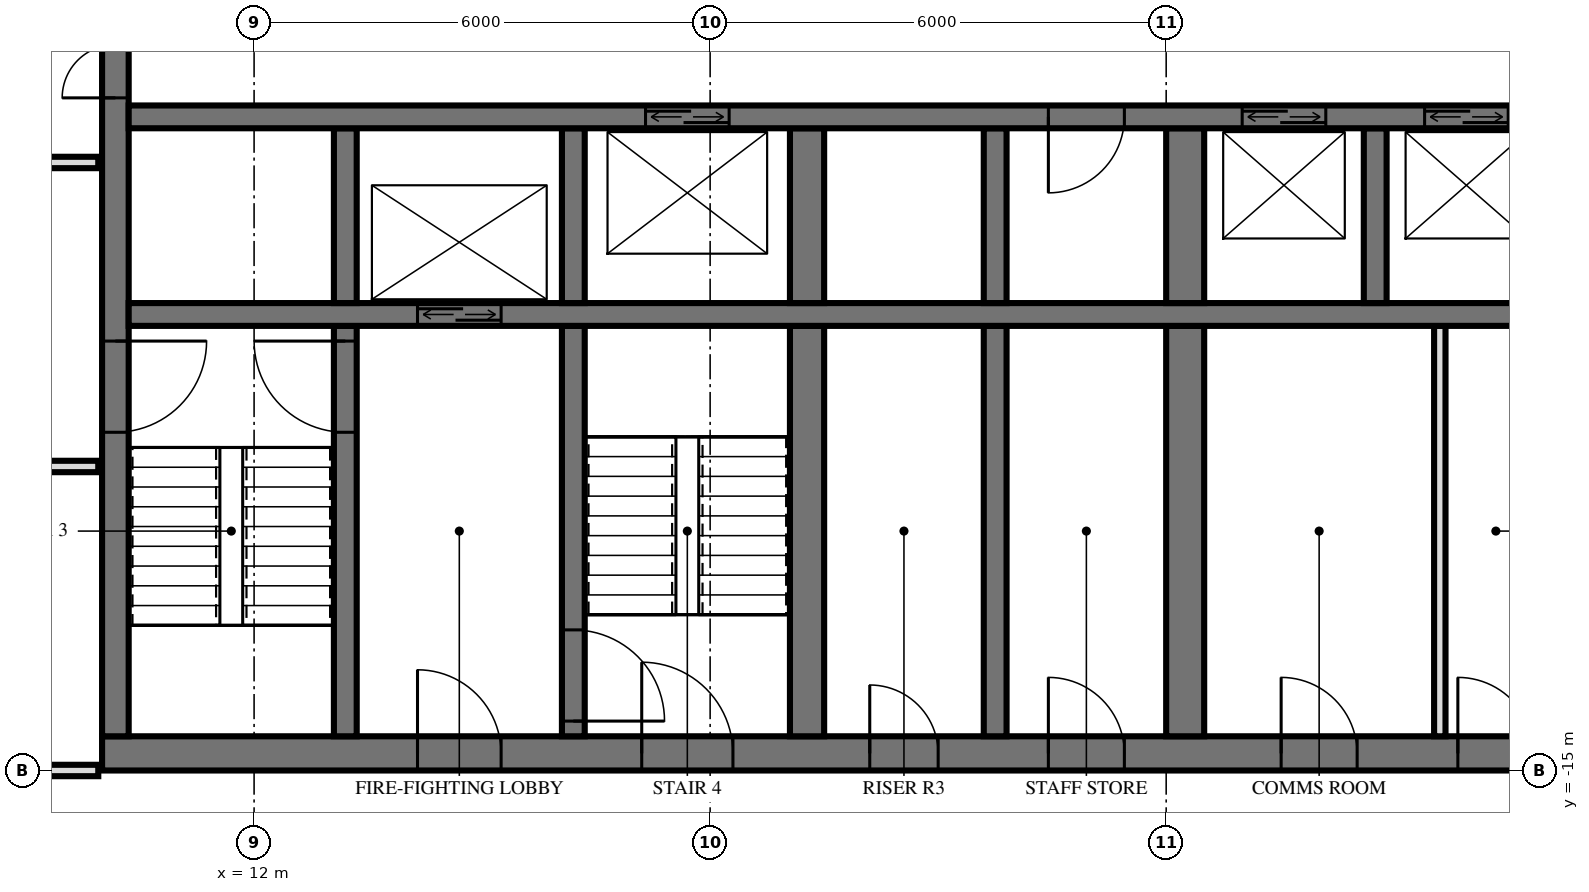
"""IFC4 building model, lengths in metres.
Left out: names, types, materials, properties, quantities, classifications, styles, units other than length and angle.
Written with IfcOpenShell. Run it as: python <this file> out.ifc"""

import sys

from ifc_helpers import new_model, si_unit, direction, frame, frame_2d, origin, place, context, subcontext, project, spatial, rectangle, extrude, element, fill, save


model = new_model("IFC4")
c1 = context("Model", 3, precision=1e-05, world=origin(), true_north=direction((0.0, 1.0)))
c2 = subcontext(c1, "Body", "Model", "MODEL_VIEW")
j1 = project(units=[si_unit("LENGTHUNIT", "METRE"), si_unit("PLANEANGLEUNIT", "RADIAN")], contexts=[c1])
p1 = place(None, origin())
s1 = spatial("IfcSite", under=j1, at=p1, CompositionType="ELEMENT")
p2 = place(p1, origin())
s2 = spatial("IfcBuilding", under=s1, at=p2, CompositionType="ELEMENT")
p3 = place(p2, frame((0.0, 0.0, 34.8)))
s3 = spatial("IfcBuildingStorey", under=s2, at=p3, CompositionType="ELEMENT", Elevation=34.8)
p4 = place(p3, frame((10.0, -14.775, 0.0), z_axis=(0.0, 0.0, 1.0), x_axis=(1.0, 0.0, 0.0)))
e1 = element("IfcWall", 1, at=p4, inside=s3, PredefinedType="SHEAR", context=c2, shape_type="SweptSolid", body=[
    extrude(rectangle(XDim=19.5, YDim=0.45, at=frame_2d((9.75, 0.0))), origin(), (0.0, 0.0, 1.0), 3.6),
])
p5 = place(p4, frame((7.1, 0.0, 0.0)))
e2 = element("IfcOpeningElement", 2, at=p5, cuts=e1, PredefinedType="OPENING", context=c2, shape_type="SweptSolid", body=[
    extrude(rectangle(XDim=1.2, YDim=2.1, at=frame_2d((0.6, 1.05))), frame((0.0, 0.235, 0.0), z_axis=(0.0, -1.0, 0.0), x_axis=(1.0, 0.0, 0.0)), (0.0, 0.0, 1.0), 0.47),
])
p6 = place(p4, frame((4.15, 0.0, 0.0)))
e3 = element("IfcOpeningElement", 3, at=p6, cuts=e1, PredefinedType="OPENING", context=c2, shape_type="SweptSolid", body=[
    extrude(rectangle(XDim=1.1, YDim=2.1, at=frame_2d((0.55, 1.05))), frame((0.0, 0.235, 0.0), z_axis=(0.0, -1.0, 0.0), x_axis=(1.0, 0.0, 0.0)), (0.0, 0.0, 1.0), 0.47),
])
p7 = place(p4, frame((10.1, 0.0, 0.0)))
e4 = element("IfcOpeningElement", 4, at=p7, cuts=e1, PredefinedType="OPENING", context=c2, shape_type="SweptSolid", body=[
    extrude(rectangle(XDim=0.9, YDim=2.1, at=frame_2d((0.45, 1.05))), frame((0.0, 0.235, 0.0), z_axis=(0.0, -1.0, 0.0), x_axis=(1.0, 0.0, 0.0)), (0.0, 0.0, 1.0), 0.47),
])
p8 = place(p4, frame((12.45, 0.0, 0.0)))
e5 = element("IfcOpeningElement", 5, at=p8, cuts=e1, PredefinedType="OPENING", context=c2, shape_type="SweptSolid", body=[
    extrude(rectangle(XDim=1.0, YDim=2.1, at=frame_2d((0.5, 1.05))), frame((0.0, 0.235, 0.0), z_axis=(0.0, -1.0, 0.0), x_axis=(1.0, 0.0, 0.0)), (0.0, 0.0, 1.0), 0.47),
])
p9 = place(p4, frame((15.512, 0.0, 0.0)))
e6 = element("IfcOpeningElement", 6, at=p9, cuts=e1, PredefinedType="OPENING", context=c2, shape_type="SweptSolid", body=[
    extrude(rectangle(XDim=1.0, YDim=2.1, at=frame_2d((0.5, 1.05))), frame((0.0, 0.235, 0.0), z_axis=(0.0, -1.0, 0.0), x_axis=(1.0, 0.0, 0.0)), (0.0, 0.0, 1.0), 0.47),
])
p10 = place(p4, frame((17.837, 0.0, 0.0)))
e7 = element("IfcOpeningElement", 7, at=p10, cuts=e1, PredefinedType="OPENING", context=c2, shape_type="SweptSolid", body=[
    extrude(rectangle(XDim=1.0, YDim=2.1, at=frame_2d((0.5, 1.05))), frame((0.0, 0.235, 0.0), z_axis=(0.0, -1.0, 0.0), x_axis=(1.0, 0.0, 0.0)), (0.0, 0.0, 1.0), 0.47),
])
p11 = place(p3, frame((10.175, -14.55, 0.0), z_axis=(0.0, 0.0, 1.0), x_axis=(0.0, 1.0, 0.0)))
e8 = element("IfcWall", 8, at=p11, inside=s3, PredefinedType="SHEAR", context=c2, shape_type="SweptSolid", body=[
    extrude(rectangle(XDim=14.1, YDim=0.35, at=frame_2d((7.05, 0.0))), origin(), (0.0, 0.0, 1.0), 3.6),
])
p12 = place(p11, frame((8.4, 0.0, 0.0)))
e9 = element("IfcOpeningElement", 9, at=p12, cuts=e8, PredefinedType="OPENING", context=c2, shape_type="SweptSolid", body=[
    extrude(rectangle(XDim=1.4, YDim=2.4, at=frame_2d((0.7, 1.2))), frame((0.0, 0.185, 0.0), z_axis=(0.0, -1.0, 0.0), x_axis=(1.0, 0.0, 0.0)), (0.0, 0.0, 1.0), 0.37),
])
p13 = place(p11, frame((10.0, 0.0, 0.0)))
e10 = element("IfcOpeningElement", 10, at=p13, cuts=e8, PredefinedType="OPENING", context=c2, shape_type="SweptSolid", body=[
    extrude(rectangle(XDim=1.4, YDim=2.4, at=frame_2d((0.7, 1.2))), frame((0.0, 0.185, 0.0), z_axis=(0.0, -1.0, 0.0), x_axis=(1.0, 0.0, 0.0)), (0.0, 0.0, 1.0), 0.37),
])
p14 = place(p11, frame((4.0, 0.0, 0.0)))
e11 = element("IfcOpeningElement", 11, at=p14, cuts=e8, PredefinedType="OPENING", context=c2, shape_type="SweptSolid", body=[
    extrude(rectangle(XDim=1.2, YDim=2.1, at=frame_2d((0.6, 1.05))), frame((0.0, 0.185, 0.0), z_axis=(0.0, -1.0, 0.0), x_axis=(1.0, 0.0, 0.0)), (0.0, 0.0, 1.0), 0.37),
])
p15 = place(p3, frame((10.35, -6.4, 0.0), z_axis=(0.0, 0.0, 1.0), x_axis=(1.0, 0.0, 0.0)))
e12 = element("IfcWall", 12, at=p15, inside=s3, PredefinedType="SHEAR", context=c2, shape_type="SweptSolid", body=[
    extrude(rectangle(XDim=18.7, YDim=0.3, at=frame_2d((9.35, 0.0))), origin(), (0.0, 0.0, 1.0), 3.6),
])
p16 = place(p15, frame((14.65, 0.0, 0.0)))
e13 = element("IfcOpeningElement", 13, at=p16, cuts=e12, PredefinedType="OPENING", context=c2, shape_type="SweptSolid", body=[
    extrude(rectangle(XDim=1.1, YDim=2.1, at=frame_2d((0.55, 1.05))), frame((0.0, 0.16, 0.0), z_axis=(0.0, -1.0, 0.0), x_axis=(1.0, 0.0, 0.0)), (0.0, 0.0, 1.0), 0.32),
])
p17 = place(p15, frame((17.05, 0.0, 0.0)))
e14 = element("IfcOpeningElement", 14, at=p17, cuts=e12, PredefinedType="OPENING", context=c2, shape_type="SweptSolid", body=[
    extrude(rectangle(XDim=1.1, YDim=2.1, at=frame_2d((0.55, 1.05))), frame((0.0, 0.16, 0.0), z_axis=(0.0, -1.0, 0.0), x_axis=(1.0, 0.0, 0.0)), (0.0, 0.0, 1.0), 0.32),
])
p18 = place(p15, frame((6.8, 0.0, 0.0)))
e15 = element("IfcOpeningElement", 15, at=p18, cuts=e12, PredefinedType="OPENING", context=c2, shape_type="SweptSolid", body=[
    extrude(rectangle(XDim=1.1, YDim=2.1, at=frame_2d((0.55, 1.05))), frame((0.0, 0.16, 0.0), z_axis=(0.0, -1.0, 0.0), x_axis=(1.0, 0.0, 0.0)), (0.0, 0.0, 1.0), 0.32),
])
p19 = place(p15, frame((12.1, 0.0, 0.0)))
e16 = element("IfcOpeningElement", 16, at=p19, cuts=e12, PredefinedType="OPENING", context=c2, shape_type="SweptSolid", body=[
    extrude(rectangle(XDim=1.0, YDim=2.1, at=frame_2d((0.5, 1.05))), frame((0.0, 0.16, 0.0), z_axis=(0.0, -1.0, 0.0), x_axis=(1.0, 0.0, 0.0)), (0.0, 0.0, 1.0), 0.32),
])
p20 = place(p3, frame((10.35, -9.0, 0.0), z_axis=(0.0, 0.0, 1.0), x_axis=(1.0, 0.0, 0.0)))
e17 = element("IfcWall", 17, at=p20, inside=s3, PredefinedType="SHEAR", context=c2, shape_type="SweptSolid", body=[
    extrude(rectangle(XDim=18.7, YDim=0.3, at=frame_2d((9.35, 0.0))), origin(), (0.0, 0.0, 1.0), 3.6),
])
p21 = place(p20, frame((3.8, 0.0, 0.0)))
e18 = element("IfcOpeningElement", 18, at=p21, cuts=e17, PredefinedType="OPENING", context=c2, shape_type="SweptSolid", body=[
    extrude(rectangle(XDim=1.1, YDim=2.1, at=frame_2d((0.55, 1.05))), frame((0.0, 0.16, 0.0), z_axis=(0.0, -1.0, 0.0), x_axis=(1.0, 0.0, 0.0)), (0.0, 0.0, 1.0), 0.32),
])
p22 = place(p3, frame((13.2, -8.85, 0.0), z_axis=(0.0, 0.0, 1.0), x_axis=(0.0, 1.0, 0.0)))
e19 = element("IfcWall", 19, at=p22, inside=s3, PredefinedType="SHEAR", context=c2, shape_type="SweptSolid", body=[
    extrude(rectangle(XDim=2.3, YDim=0.3, at=frame_2d((1.15, 0.0))), origin(), (0.0, 0.0, 1.0), 3.6),
])
p23 = place(p3, frame((13.2, -14.55, 0.0), z_axis=(0.0, 0.0, 1.0), x_axis=(0.0, 1.0, 0.0)))
e20 = element("IfcWall", 20, at=p23, inside=s3, PredefinedType="SHEAR", context=c2, shape_type="SweptSolid", body=[
    extrude(rectangle(XDim=5.4, YDim=0.3, at=frame_2d((2.7, 0.0))), origin(), (0.0, 0.0, 1.0), 3.6),
])
p24 = place(p23, frame((4.0, 0.0, 0.0)))
e21 = element("IfcOpeningElement", 21, at=p24, cuts=e20, PredefinedType="OPENING", context=c2, shape_type="SweptSolid", body=[
    extrude(rectangle(XDim=1.2, YDim=2.1, at=frame_2d((0.6, 1.05))), frame((0.0, 0.16, 0.0), z_axis=(0.0, -1.0, 0.0), x_axis=(1.0, 0.0, 0.0)), (0.0, 0.0, 1.0), 0.32),
])
p25 = place(p3, frame((16.2, -8.85, 0.0), z_axis=(0.0, 0.0, 1.0), x_axis=(0.0, 1.0, 0.0)))
e22 = element("IfcWall", 22, at=p25, inside=s3, PredefinedType="SHEAR", context=c2, shape_type="SweptSolid", body=[
    extrude(rectangle(XDim=2.3, YDim=0.3, at=frame_2d((1.15, 0.0))), origin(), (0.0, 0.0, 1.0), 3.6),
])
p26 = place(p3, frame((16.2, -14.55, 0.0), z_axis=(0.0, 0.0, 1.0), x_axis=(0.0, 1.0, 0.0)))
e23 = element("IfcWall", 23, at=p26, inside=s3, PredefinedType="SHEAR", context=c2, shape_type="SweptSolid", body=[
    extrude(rectangle(XDim=5.4, YDim=0.3, at=frame_2d((2.7, 0.0))), origin(), (0.0, 0.0, 1.0), 3.6),
])
p27 = place(p26, frame((0.2, 0.0, 0.0)))
e24 = element("IfcOpeningElement", 24, at=p27, cuts=e23, PredefinedType="OPENING", context=c2, shape_type="SweptSolid", body=[
    extrude(rectangle(XDim=1.2, YDim=2.1, at=frame_2d((0.6, 1.05))), frame((0.0, 0.16, 0.0), z_axis=(0.0, -1.0, 0.0), x_axis=(1.0, 0.0, 0.0)), (0.0, 0.0, 1.0), 0.32),
])
p28 = place(p3, frame((19.275, -8.85, 0.0), z_axis=(0.0, 0.0, 1.0), x_axis=(0.0, 1.0, 0.0)))
e25 = element("IfcWall", 25, at=p28, inside=s3, PredefinedType="SHEAR", context=c2, shape_type="SweptSolid", body=[
    extrude(rectangle(XDim=2.3, YDim=0.45, at=frame_2d((1.15, 0.0))), origin(), (0.0, 0.0, 1.0), 3.6),
])
p29 = place(p3, frame((19.275, -14.55, 0.0), z_axis=(0.0, 0.0, 1.0), x_axis=(0.0, 1.0, 0.0)))
e26 = element("IfcWall", 26, at=p29, inside=s3, PredefinedType="SHEAR", context=c2, shape_type="SweptSolid", body=[
    extrude(rectangle(XDim=5.4, YDim=0.45, at=frame_2d((2.7, 0.0))), origin(), (0.0, 0.0, 1.0), 3.6),
])
p30 = place(p3, frame((21.75, -8.85, 0.0), z_axis=(0.0, 0.0, 1.0), x_axis=(0.0, 1.0, 0.0)))
e27 = element("IfcWall", 27, at=p30, inside=s3, PredefinedType="SHEAR", context=c2, shape_type="SweptSolid", body=[
    extrude(rectangle(XDim=2.3, YDim=0.3, at=frame_2d((1.15, 0.0))), origin(), (0.0, 0.0, 1.0), 3.6),
])
p31 = place(p3, frame((21.75, -14.55, 0.0), z_axis=(0.0, 0.0, 1.0), x_axis=(0.0, 1.0, 0.0)))
e28 = element("IfcWall", 28, at=p31, inside=s3, PredefinedType="SHEAR", context=c2, shape_type="SweptSolid", body=[
    extrude(rectangle(XDim=5.4, YDim=0.3, at=frame_2d((2.7, 0.0))), origin(), (0.0, 0.0, 1.0), 3.6),
])
p32 = place(p3, frame((24.25, -8.85, 0.0), z_axis=(0.0, 0.0, 1.0), x_axis=(0.0, 1.0, 0.0)))
e29 = element("IfcWall", 29, at=p32, inside=s3, PredefinedType="SHEAR", context=c2, shape_type="SweptSolid", body=[
    extrude(rectangle(XDim=2.3, YDim=0.5, at=frame_2d((1.15, 0.0))), origin(), (0.0, 0.0, 1.0), 3.6),
])
p33 = place(p3, frame((24.25, -14.55, 0.0), z_axis=(0.0, 0.0, 1.0), x_axis=(0.0, 1.0, 0.0)))
e30 = element("IfcWall", 30, at=p33, inside=s3, PredefinedType="SHEAR", context=c2, shape_type="SweptSolid", body=[
    extrude(rectangle(XDim=5.4, YDim=0.5, at=frame_2d((2.7, 0.0))), origin(), (0.0, 0.0, 1.0), 3.6),
])
p34 = place(p3, frame((26.75, -8.85, 0.0), z_axis=(0.0, 0.0, 1.0), x_axis=(0.0, 1.0, 0.0)))
e31 = element("IfcWall", 31, at=p34, inside=s3, PredefinedType="SHEAR", context=c2, shape_type="SweptSolid", body=[
    extrude(rectangle(XDim=2.3, YDim=0.3, at=frame_2d((1.15, 0.0))), origin(), (0.0, 0.0, 1.0), 3.6),
])
p35 = place(p3, frame((27.6, -14.55, 0.0), z_axis=(0.0, 0.0, 1.0), x_axis=(0.0, 1.0, 0.0)))
e32 = element("IfcWall", 32, at=p35, inside=s3, PredefinedType="PARTITIONING", context=c2, shape_type="SweptSolid", body=[
    extrude(rectangle(XDim=5.4, YDim=0.15, at=frame_2d((2.7, 0.0))), origin(), (0.0, 0.0, 1.0), 3.3),
])
p36 = place(p3, frame((-9.95, -15.0, 0.0), z_axis=(0.0, 0.0, 1.0), x_axis=(1.0, 0.0, 0.0)))
e33 = element("IfcWall", 33, at=p36, inside=s3, PredefinedType="PARTITIONING", context=c2, shape_type="SweptSolid", body=[
    extrude(rectangle(XDim=19.9, YDim=0.15, at=frame_2d((9.95, 0.0))), origin(), (0.0, 0.0, 1.0), 2.684),
])
p37 = place(p36, frame((9.45, 0.0, 0.0)))
e34 = element("IfcOpeningElement", 34, at=p37, cuts=e33, PredefinedType="OPENING", context=c2, shape_type="SweptSolid", body=[
    extrude(rectangle(XDim=1.0, YDim=2.1, at=frame_2d((0.5, 1.05))), frame((0.0, 0.085, 0.0), z_axis=(0.0, -1.0, 0.0), x_axis=(1.0, 0.0, 0.0)), (0.0, 0.0, 1.0), 0.17),
])
p38 = place(p3, frame((-9.95, -11.0, 0.0), z_axis=(0.0, 0.0, 1.0), x_axis=(1.0, 0.0, 0.0)))
e35 = element("IfcWall", 35, at=p38, inside=s3, PredefinedType="PARTITIONING", context=c2, shape_type="SweptSolid", body=[
    extrude(rectangle(XDim=19.9, YDim=0.15, at=frame_2d((9.95, 0.0))), origin(), (0.0, 0.0, 1.0), 3.32),
])
p39 = place(p38, frame((9.45, 0.0, 0.0)))
e36 = element("IfcOpeningElement", 36, at=p39, cuts=e35, PredefinedType="OPENING", context=c2, shape_type="SweptSolid", body=[
    extrude(rectangle(XDim=1.0, YDim=2.1, at=frame_2d((0.5, 1.05))), frame((0.0, 0.085, 0.0), z_axis=(0.0, -1.0, 0.0), x_axis=(1.0, 0.0, 0.0)), (0.0, 0.0, 1.0), 0.17),
])
p40 = place(p38, frame((3.45, 0.0, 0.0)))
e37 = element("IfcOpeningElement", 37, at=p40, cuts=e35, PredefinedType="OPENING", context=c2, shape_type="SweptSolid", body=[
    extrude(rectangle(XDim=1.0, YDim=2.1, at=frame_2d((0.5, 1.05))), frame((0.0, 0.085, 0.0), z_axis=(0.0, -1.0, 0.0), x_axis=(1.0, 0.0, 0.0)), (0.0, 0.0, 1.0), 0.17),
])
p41 = place(p3, frame((-9.95, -7.0, 0.0), z_axis=(0.0, 0.0, 1.0), x_axis=(1.0, 0.0, 0.0)))
e38 = element("IfcWall", 38, at=p41, inside=s3, PredefinedType="PARTITIONING", context=c2, shape_type="SweptSolid", body=[
    extrude(rectangle(XDim=19.9, YDim=0.15, at=frame_2d((9.95, 0.0))), origin(), (0.0, 0.0, 1.0), 3.32),
])
p42 = place(p41, frame((9.45, 0.0, 0.0)))
e39 = element("IfcOpeningElement", 39, at=p42, cuts=e38, PredefinedType="OPENING", context=c2, shape_type="SweptSolid", body=[
    extrude(rectangle(XDim=1.0, YDim=2.1, at=frame_2d((0.5, 1.05))), frame((0.0, 0.085, 0.0), z_axis=(0.0, -1.0, 0.0), x_axis=(1.0, 0.0, 0.0)), (0.0, 0.0, 1.0), 0.17),
])
p43 = place(p41, frame((15.45, 0.0, 0.0)))
e40 = element("IfcOpeningElement", 40, at=p43, cuts=e38, PredefinedType="OPENING", context=c2, shape_type="SweptSolid", body=[
    extrude(rectangle(XDim=1.0, YDim=2.1, at=frame_2d((0.5, 1.05))), frame((0.0, 0.085, 0.0), z_axis=(0.0, -1.0, 0.0), x_axis=(1.0, 0.0, 0.0)), (0.0, 0.0, 1.0), 0.17),
])
p44 = place(p16, origin())
e41 = element("IfcDoor", 41, at=p44, inside=s3, OperationType="DOUBLE_DOOR_SLIDING", PredefinedType="USERDEFINED", context=c2, shape_type="SweptSolid", body=[
    extrude(rectangle(XDim=1.1, YDim=2.1, at=frame_2d((0.55, 1.05))), frame((0.0, 0.025, 0.0), z_axis=(0.0, -1.0, 0.0), x_axis=(1.0, 0.0, 0.0)), (0.0, 0.0, 1.0), 0.05),
])
fill(e13, e41)
p45 = place(p17, origin())
e42 = element("IfcDoor", 42, at=p45, inside=s3, OperationType="DOUBLE_DOOR_SLIDING", PredefinedType="USERDEFINED", context=c2, shape_type="SweptSolid", body=[
    extrude(rectangle(XDim=1.1, YDim=2.1, at=frame_2d((0.55, 1.05))), frame((0.0, 0.025, 0.0), z_axis=(0.0, -1.0, 0.0), x_axis=(1.0, 0.0, 0.0)), (0.0, 0.0, 1.0), 0.05),
])
fill(e14, e42)
p46 = place(p21, origin())
e43 = element("IfcDoor", 43, at=p46, inside=s3, OperationType="DOUBLE_DOOR_SLIDING", PredefinedType="USERDEFINED", context=c2, shape_type="SweptSolid", body=[
    extrude(rectangle(XDim=1.1, YDim=2.1, at=frame_2d((0.55, 1.05))), frame((0.0, 0.025, 0.0), z_axis=(0.0, -1.0, 0.0), x_axis=(1.0, 0.0, 0.0)), (0.0, 0.0, 1.0), 0.05),
])
fill(e18, e43)
p47 = place(p18, origin())
e44 = element("IfcDoor", 44, at=p47, inside=s3, OperationType="DOUBLE_DOOR_SLIDING", PredefinedType="USERDEFINED", context=c2, shape_type="SweptSolid", body=[
    extrude(rectangle(XDim=1.1, YDim=2.1, at=frame_2d((0.55, 1.05))), frame((0.0, 0.025, 0.0), z_axis=(0.0, -1.0, 0.0), x_axis=(1.0, 0.0, 0.0)), (0.0, 0.0, 1.0), 0.05),
])
fill(e15, e44)
p48 = place(p12, origin())
e45 = element("IfcDoor", 45, at=p48, inside=s3, OperationType="DOUBLE_DOOR_SINGLE_SWING", PredefinedType="DOOR", context=c2, shape_type="SweptSolid", body=[
    extrude(rectangle(XDim=1.4, YDim=2.4, at=frame_2d((0.7, 1.2))), frame((0.0, 0.025, 0.0), z_axis=(0.0, -1.0, 0.0), x_axis=(1.0, 0.0, 0.0)), (0.0, 0.0, 1.0), 0.05),
])
fill(e9, e45)
p49 = place(p14, frame((0.6, 0.0, 0.0), z_axis=(0.0, 0.0, 1.0), x_axis=(-1.0, 0.0, 0.0)))
e46 = element("IfcDoor", 46, at=p49, inside=s3, OperationType="SINGLE_SWING_RIGHT", PredefinedType="DOOR", context=c2, shape_type="SweptSolid", body=[
    extrude(rectangle(XDim=1.2, YDim=2.1, at=frame_2d((0.0, 1.05))), frame((0.0, -0.025, 0.0), z_axis=(0.0, 1.0, 0.0), x_axis=(-1.0, 0.0, 0.0)), (0.0, 0.0, 1.0), 0.05),
])
fill(e11, e46)
p50 = place(p5, origin())
e47 = element("IfcDoor", 47, at=p50, inside=s3, OperationType="SINGLE_SWING_RIGHT", PredefinedType="DOOR", context=c2, shape_type="SweptSolid", body=[
    extrude(rectangle(XDim=1.2, YDim=2.1, at=frame_2d((0.6, 1.05))), frame((0.0, 0.025, 0.0), z_axis=(0.0, -1.0, 0.0), x_axis=(1.0, 0.0, 0.0)), (0.0, 0.0, 1.0), 0.05),
])
fill(e2, e47)
p51 = place(p6, origin())
e48 = element("IfcDoor", 48, at=p51, inside=s3, OperationType="SINGLE_SWING_RIGHT", PredefinedType="DOOR", context=c2, shape_type="SweptSolid", body=[
    extrude(rectangle(XDim=1.1, YDim=2.1, at=frame_2d((0.55, 1.05))), frame((0.0, 0.025, 0.0), z_axis=(0.0, -1.0, 0.0), x_axis=(1.0, 0.0, 0.0)), (0.0, 0.0, 1.0), 0.05),
])
fill(e3, e48)
p52 = place(p7, origin())
e49 = element("IfcDoor", 49, at=p52, inside=s3, OperationType="SINGLE_SWING_RIGHT", PredefinedType="DOOR", context=c2, shape_type="SweptSolid", body=[
    extrude(rectangle(XDim=0.9, YDim=2.1, at=frame_2d((0.45, 1.05))), frame((0.0, 0.025, 0.0), z_axis=(0.0, -1.0, 0.0), x_axis=(1.0, 0.0, 0.0)), (0.0, 0.0, 1.0), 0.05),
])
fill(e4, e49)
p53 = place(p8, origin())
e50 = element("IfcDoor", 50, at=p53, inside=s3, OperationType="SINGLE_SWING_RIGHT", PredefinedType="DOOR", context=c2, shape_type="SweptSolid", body=[
    extrude(rectangle(XDim=1.0, YDim=2.1, at=frame_2d((0.5, 1.05))), frame((0.0, 0.025, 0.0), z_axis=(0.0, -1.0, 0.0), x_axis=(1.0, 0.0, 0.0)), (0.0, 0.0, 1.0), 0.05),
])
fill(e5, e50)
p54 = place(p9, origin())
e51 = element("IfcDoor", 51, at=p54, inside=s3, OperationType="SINGLE_SWING_RIGHT", PredefinedType="DOOR", context=c2, shape_type="SweptSolid", body=[
    extrude(rectangle(XDim=1.0, YDim=2.1, at=frame_2d((0.5, 1.05))), frame((0.0, 0.025, 0.0), z_axis=(0.0, -1.0, 0.0), x_axis=(1.0, 0.0, 0.0)), (0.0, 0.0, 1.0), 0.05),
])
fill(e6, e51)
p55 = place(p10, origin())
e52 = element("IfcDoor", 52, at=p55, inside=s3, OperationType="SINGLE_SWING_RIGHT", PredefinedType="DOOR", context=c2, shape_type="SweptSolid", body=[
    extrude(rectangle(XDim=1.0, YDim=2.1, at=frame_2d((0.5, 1.05))), frame((0.0, 0.025, 0.0), z_axis=(0.0, -1.0, 0.0), x_axis=(1.0, 0.0, 0.0)), (0.0, 0.0, 1.0), 0.05),
])
fill(e7, e52)
p56 = place(p19, frame((0.5, 0.0, 0.0), z_axis=(0.0, 0.0, 1.0), x_axis=(-1.0, 0.0, 0.0)))
e53 = element("IfcDoor", 53, at=p56, inside=s3, OperationType="SINGLE_SWING_LEFT", PredefinedType="DOOR", context=c2, shape_type="SweptSolid", body=[
    extrude(rectangle(XDim=1.0, YDim=2.1, at=frame_2d((0.0, 1.05))), frame((0.0, -0.025, 0.0), z_axis=(0.0, 1.0, 0.0), x_axis=(-1.0, 0.0, 0.0)), (0.0, 0.0, 1.0), 0.05),
])
fill(e16, e53)
p57 = place(p24, origin())
e54 = element("IfcDoor", 54, at=p57, inside=s3, OperationType="SINGLE_SWING_LEFT", PredefinedType="DOOR", context=c2, shape_type="SweptSolid", body=[
    extrude(rectangle(XDim=1.2, YDim=2.1, at=frame_2d((0.6, 1.05))), frame((0.0, 0.025, 0.0), z_axis=(0.0, -1.0, 0.0), x_axis=(1.0, 0.0, 0.0)), (0.0, 0.0, 1.0), 0.05),
])
fill(e21, e54)
p58 = place(p27, frame((0.6, 0.0, 0.0), z_axis=(0.0, 0.0, 1.0), x_axis=(-1.0, 0.0, 0.0)))
e55 = element("IfcDoor", 55, at=p58, inside=s3, OperationType="SINGLE_SWING_LEFT", PredefinedType="DOOR", context=c2, shape_type="SweptSolid", body=[
    extrude(rectangle(XDim=1.2, YDim=2.1, at=frame_2d((0.0, 1.05))), frame((0.0, -0.025, 0.0), z_axis=(0.0, 1.0, 0.0), x_axis=(-1.0, 0.0, 0.0)), (0.0, 0.0, 1.0), 0.05),
])
fill(e24, e55)
save(model, sys.argv[1])
